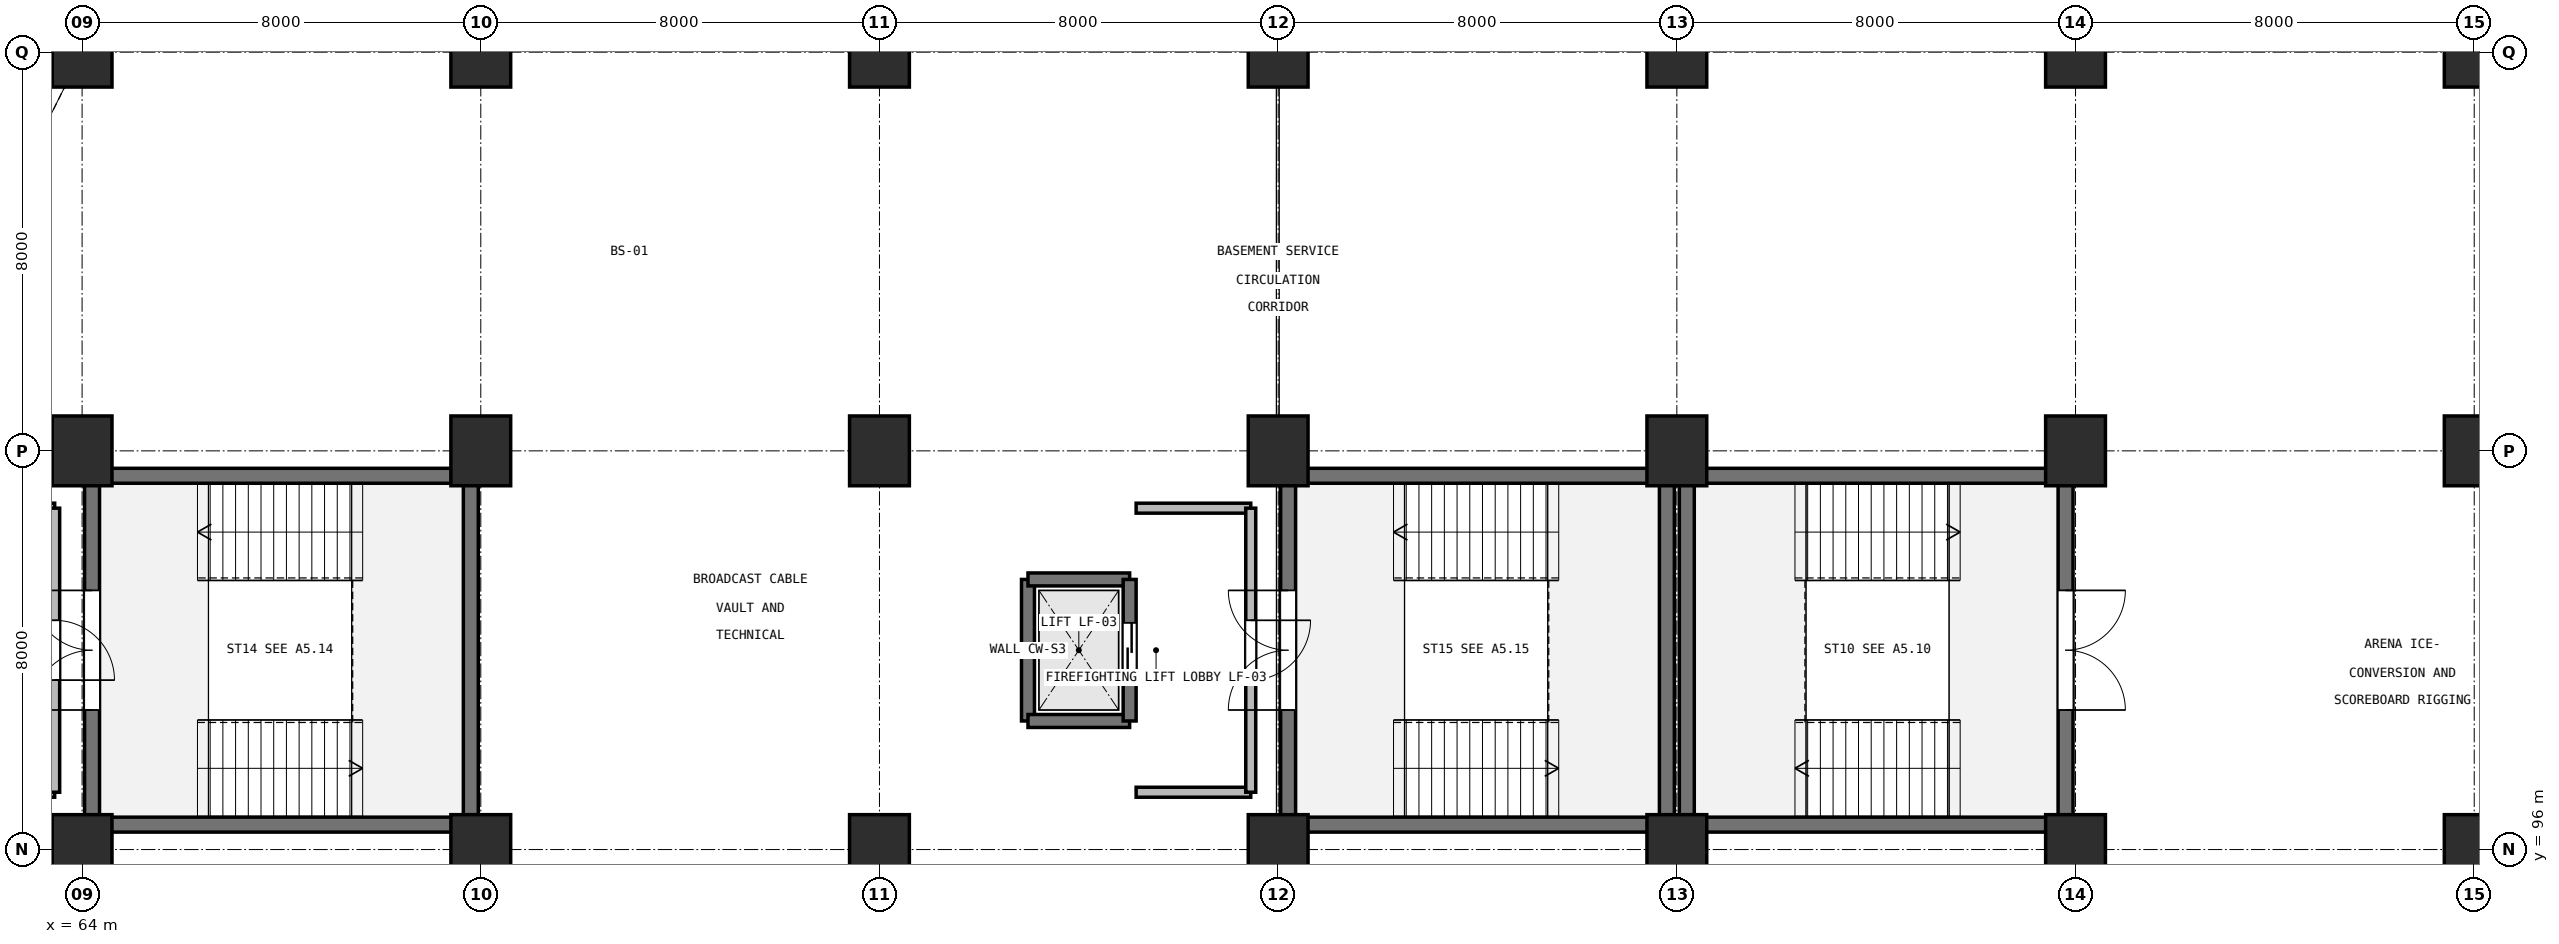
"""IFC4 building model, lengths in metres.
Left out: names, types, materials, properties, quantities, classifications, styles, units other than length and angle.
Written with IfcOpenShell. Run it as: python <this file> out.ifc"""

import sys

from ifc_helpers import new_model, si_unit, direction, frame, frame_2d, origin, origin_2d, place, context, subcontext, project, spatial, rectangle, extrude, element, fill, save


model = new_model("IFC4")
c1 = context("Model", 3, precision=1e-05, world=origin(), true_north=direction((0.0, 1.0)))
c2 = subcontext(c1, "Body", "Model", "MODEL_VIEW")
j1 = project(units=[si_unit("LENGTHUNIT", "METRE"), si_unit("PLANEANGLEUNIT", "RADIAN")], contexts=[c1])
p1 = place(None, origin())
s1 = spatial("IfcSite", under=j1, at=p1, CompositionType="ELEMENT")
p2 = place(p1, origin())
s2 = spatial("IfcBuilding", under=s1, at=p2, CompositionType="ELEMENT")
p3 = place(p2, frame((0.0, 0.0, -4.8)))
s3 = spatial("IfcBuildingStorey", under=s2, at=p3, CompositionType="ELEMENT", Elevation=-4.8)
for number, where, z_axis, x_axis in (
    (1, (64.0, 96.0, 0.0), (0.0, 0.0, 1.0), (1.0, 0.0, 0.0)),
    (2, (64.0, 104.0, 0.0), (0.0, 0.0, 1.0), (1.0, 0.0, 0.0)),
    (3, (64.0, 112.0, 0.0), (0.0, 0.0, 1.0), (1.0, 0.0, 0.0)),
    (4, (72.0, 96.0, 0.0), (0.0, 0.0, 1.0), (1.0, 0.0, 0.0)),
    (5, (72.0, 104.0, 0.0), (0.0, 0.0, 1.0), (1.0, 0.0, 0.0)),
    (6, (72.0, 112.0, 0.0), (0.0, 0.0, 1.0), (1.0, 0.0, 0.0)),
    (7, (80.0, 96.0, 0.0), (0.0, 0.0, 1.0), (1.0, 0.0, 0.0)),
    (8, (80.0, 104.0, 0.0), (0.0, 0.0, 1.0), (1.0, 0.0, 0.0)),
    (9, (80.0, 112.0, 0.0), (0.0, 0.0, 1.0), (1.0, 0.0, 0.0)),
    (10, (88.0, 96.0, 0.0), (0.0, 0.0, 1.0), (1.0, 0.0, 0.0)),
    (11, (88.0, 104.0, 0.0), (0.0, 0.0, 1.0), (1.0, 0.0, 0.0)),
    (12, (88.0, 112.0, 0.0), (0.0, 0.0, 1.0), (1.0, 0.0, 0.0)),
    (13, (96.0, 96.0, 0.0), (0.0, 0.0, 1.0), (1.0, 0.0, 0.0)),
    (14, (96.0, 104.0, 0.0), (0.0, 0.0, 1.0), (1.0, 0.0, 0.0)),
    (15, (96.0, 112.0, 0.0), (0.0, 0.0, 1.0), (1.0, 0.0, 0.0)),
    (16, (104.0, 96.0, 0.0), (0.0, 0.0, 1.0), (1.0, 0.0, 0.0)),
    (17, (104.0, 104.0, 0.0), (0.0, 0.0, 1.0), (1.0, 0.0, 0.0)),
    (18, (104.0, 112.0, 0.0), (0.0, 0.0, 1.0), (1.0, 0.0, 0.0)),
    (19, (112.0, 96.0, 0.0), (0.0, 0.0, 1.0), (1.0, 0.0, 0.0)),
    (20, (112.0, 104.0, 0.0), (0.0, 0.0, 1.0), (1.0, 0.0, 0.0)),
    (21, (112.0, 112.0, 0.0), (0.0, 0.0, 1.0), (1.0, 0.0, 0.0)),
):
    element("IfcColumn", number, at=place(p3, frame(where, z_axis=z_axis, x_axis=x_axis)), inside=s3, PredefinedType="COLUMN", context=c2, shape_type="SweptSolid", body=[
        extrude(rectangle(XDim=1.2, YDim=1.4, at=origin_2d()), origin(), (0.0, 0.0, 1.0), 4.8),
    ])
p4 = place(p3, frame((103.8, 96.5, 0.0), z_axis=(0.0, 0.0, 1.0), x_axis=(-1.0, 0.0, 0.0)))
e22 = element("IfcWall", 22, at=p4, inside=s3, PredefinedType="SHEAR", context=c2, shape_type="SweptSolid", body=[
    extrude(rectangle(XDim=7.6, YDim=0.3, at=frame_2d((3.8, 0.0))), origin(), (0.0, 0.0, 1.0), 4.46),
])
p5 = place(p3, frame((96.2, 96.5, 0.0), z_axis=(0.0, 0.0, 1.0), x_axis=(0.0, 1.0, 0.0)))
e23 = element("IfcWall", 23, at=p5, inside=s3, PredefinedType="SHEAR", context=c2, shape_type="SweptSolid", body=[
    extrude(rectangle(XDim=7.0, YDim=0.3, at=frame_2d((3.5, 0.0))), origin(), (0.0, 0.0, 1.0), 4.46),
])
p6 = place(p3, frame((96.2, 103.5, 0.0), z_axis=(0.0, 0.0, 1.0), x_axis=(1.0, 0.0, 0.0)))
e24 = element("IfcWall", 24, at=p6, inside=s3, PredefinedType="SHEAR", context=c2, shape_type="SweptSolid", body=[
    extrude(rectangle(XDim=7.6, YDim=0.3, at=frame_2d((3.8, 0.0))), origin(), (0.0, 0.0, 1.0), 4.46),
])
p7 = place(p3, frame((103.8, 103.5, 0.0), z_axis=(0.0, 0.0, 1.0), x_axis=(0.0, -1.0, 0.0)))
e25 = element("IfcWall", 25, at=p7, inside=s3, PredefinedType="SHEAR", context=c2, shape_type="SweptSolid", body=[
    extrude(rectangle(XDim=7.0, YDim=0.3, at=frame_2d((3.5, 0.0))), origin(), (0.0, 0.0, 1.0), 4.46),
])
p8 = place(p7, frame((2.3, 0.0, 0.0)))
e26 = element("IfcOpeningElement", 26, at=p8, cuts=e25, PredefinedType="OPENING", context=c2, shape_type="SweptSolid", body=[
    extrude(rectangle(XDim=2.4, YDim=2.2, at=frame_2d((1.2, 1.1))), frame((0.0, 0.16, 0.0), z_axis=(0.0, -1.0, 0.0), x_axis=(1.0, 0.0, 0.0)), (0.0, 0.0, 1.0), 0.32),
])
p9 = place(p3, frame((71.8, 96.5, 0.0), z_axis=(0.0, 0.0, 1.0), x_axis=(-1.0, 0.0, 0.0)))
e27 = element("IfcWall", 27, at=p9, inside=s3, PredefinedType="SHEAR", context=c2, shape_type="SweptSolid", body=[
    extrude(rectangle(XDim=7.6, YDim=0.3, at=frame_2d((3.8, 0.0))), origin(), (0.0, 0.0, 1.0), 4.46),
])
p10 = place(p3, frame((64.2, 96.5, 0.0), z_axis=(0.0, 0.0, 1.0), x_axis=(0.0, 1.0, 0.0)))
e28 = element("IfcWall", 28, at=p10, inside=s3, PredefinedType="SHEAR", context=c2, shape_type="SweptSolid", body=[
    extrude(rectangle(XDim=7.0, YDim=0.3, at=frame_2d((3.5, 0.0))), origin(), (0.0, 0.0, 1.0), 4.46),
])
p11 = place(p10, frame((2.3, 0.0, 0.0)))
e29 = element("IfcOpeningElement", 29, at=p11, cuts=e28, PredefinedType="OPENING", context=c2, shape_type="SweptSolid", body=[
    extrude(rectangle(XDim=2.4, YDim=2.2, at=frame_2d((1.2, 1.1))), frame((0.0, 0.16, 0.0), z_axis=(0.0, -1.0, 0.0), x_axis=(1.0, 0.0, 0.0)), (0.0, 0.0, 1.0), 0.32),
])
p12 = place(p3, frame((64.2, 103.5, 0.0), z_axis=(0.0, 0.0, 1.0), x_axis=(1.0, 0.0, 0.0)))
e30 = element("IfcWall", 30, at=p12, inside=s3, PredefinedType="SHEAR", context=c2, shape_type="SweptSolid", body=[
    extrude(rectangle(XDim=7.6, YDim=0.3, at=frame_2d((3.8, 0.0))), origin(), (0.0, 0.0, 1.0), 4.46),
])
p13 = place(p3, frame((71.8, 103.5, 0.0), z_axis=(0.0, 0.0, 1.0), x_axis=(0.0, -1.0, 0.0)))
e31 = element("IfcWall", 31, at=p13, inside=s3, PredefinedType="SHEAR", context=c2, shape_type="SweptSolid", body=[
    extrude(rectangle(XDim=7.0, YDim=0.3, at=frame_2d((3.5, 0.0))), origin(), (0.0, 0.0, 1.0), 4.46),
])
p14 = place(p3, frame((95.8, 96.5, 0.0), z_axis=(0.0, 0.0, 1.0), x_axis=(-1.0, 0.0, 0.0)))
e32 = element("IfcWall", 32, at=p14, inside=s3, PredefinedType="SHEAR", context=c2, shape_type="SweptSolid", body=[
    extrude(rectangle(XDim=7.6, YDim=0.3, at=frame_2d((3.8, 0.0))), origin(), (0.0, 0.0, 1.0), 4.46),
])
p15 = place(p3, frame((88.2, 96.5, 0.0), z_axis=(0.0, 0.0, 1.0), x_axis=(0.0, 1.0, 0.0)))
e33 = element("IfcWall", 33, at=p15, inside=s3, PredefinedType="SHEAR", context=c2, shape_type="SweptSolid", body=[
    extrude(rectangle(XDim=7.0, YDim=0.3, at=frame_2d((3.5, 0.0))), origin(), (0.0, 0.0, 1.0), 4.46),
])
p16 = place(p15, frame((2.3, 0.0, 0.0)))
e34 = element("IfcOpeningElement", 34, at=p16, cuts=e33, PredefinedType="OPENING", context=c2, shape_type="SweptSolid", body=[
    extrude(rectangle(XDim=2.4, YDim=2.2, at=frame_2d((1.2, 1.1))), frame((0.0, 0.16, 0.0), z_axis=(0.0, -1.0, 0.0), x_axis=(1.0, 0.0, 0.0)), (0.0, 0.0, 1.0), 0.32),
])
p17 = place(p3, frame((88.2, 103.5, 0.0), z_axis=(0.0, 0.0, 1.0), x_axis=(1.0, 0.0, 0.0)))
e35 = element("IfcWall", 35, at=p17, inside=s3, PredefinedType="SHEAR", context=c2, shape_type="SweptSolid", body=[
    extrude(rectangle(XDim=7.6, YDim=0.3, at=frame_2d((3.8, 0.0))), origin(), (0.0, 0.0, 1.0), 4.46),
])
p18 = place(p3, frame((95.8, 103.5, 0.0), z_axis=(0.0, 0.0, 1.0), x_axis=(0.0, -1.0, 0.0)))
e36 = element("IfcWall", 36, at=p18, inside=s3, PredefinedType="SHEAR", context=c2, shape_type="SweptSolid", body=[
    extrude(rectangle(XDim=7.0, YDim=0.3, at=frame_2d((3.5, 0.0))), origin(), (0.0, 0.0, 1.0), 4.46),
])
for number, where, z_axis, x_axis in (
    (37, (59.35, 102.85, 0.0), (0.0, 0.0, 1.0), (1.0, 0.0, 0.0)),
    (38, (63.45, 97.15, 0.0), (0.0, 0.0, 1.0), (-1.0, 0.0, 0.0)),
):
    element("IfcWall", number, at=place(p3, frame(where, z_axis=z_axis, x_axis=x_axis)), inside=s3, PredefinedType="PARTITIONING", context=c2, shape_type="SweptSolid", body=[
        extrude(rectangle(XDim=4.1, YDim=0.2, at=frame_2d((2.05, 0.0))), origin(), (0.0, 0.0, 1.0), 4.46),
    ])
p19 = place(p3, frame((63.45, 102.85, 0.0), z_axis=(0.0, 0.0, 1.0), x_axis=(0.0, -1.0, 0.0)))
e39 = element("IfcWall", 39, at=p19, inside=s3, PredefinedType="PARTITIONING", context=c2, shape_type="SweptSolid", body=[
    extrude(rectangle(XDim=5.7, YDim=0.2, at=frame_2d((2.85, 0.0))), origin(), (0.0, 0.0, 1.0), 3.45),
])
p20 = place(p19, frame((2.25, 0.0, 0.0)))
e40 = element("IfcOpeningElement", 40, at=p20, cuts=e39, PredefinedType="OPENING", context=c2, shape_type="SweptSolid", body=[
    extrude(rectangle(XDim=1.2, YDim=2.2, at=frame_2d((0.6, 1.1))), frame((0.0, 0.11, 0.0), z_axis=(0.0, -1.0, 0.0), x_axis=(1.0, 0.0, 0.0)), (0.0, 0.0, 1.0), 0.22),
])
p21 = place(p3, frame((82.98, 98.58, 0.0), z_axis=(0.0, 0.0, 1.0), x_axis=(0.0, 1.0, 0.0)))
e41 = element("IfcWall", 41, at=p21, inside=s3, PredefinedType="SHEAR", context=c2, shape_type="SweptSolid", body=[
    extrude(rectangle(XDim=2.84, YDim=0.26, at=frame_2d((1.42, 0.0))), origin(), (0.0, 0.0, 1.0), 4.46),
])
for number, where, z_axis, x_axis in (
    (42, (82.98, 101.42, 0.0), (0.0, 0.0, 1.0), (1.0, 0.0, 0.0)),
    (43, (85.02, 98.58, 0.0), (0.0, 0.0, 1.0), (-1.0, 0.0, 0.0)),
):
    element("IfcWall", number, at=place(p3, frame(where, z_axis=z_axis, x_axis=x_axis)), inside=s3, PredefinedType="SHEAR", context=c2, shape_type="SweptSolid", body=[
        extrude(rectangle(XDim=2.04, YDim=0.26, at=frame_2d((1.02, 0.0))), origin(), (0.0, 0.0, 1.0), 4.46),
    ])
p22 = place(p3, frame((85.02, 101.42, 0.0), z_axis=(0.0, 0.0, 1.0), x_axis=(0.0, -1.0, 0.0)))
e44 = element("IfcWall", 44, at=p22, inside=s3, PredefinedType="SHEAR", context=c2, shape_type="SweptSolid", body=[
    extrude(rectangle(XDim=2.84, YDim=0.26, at=frame_2d((1.42, 0.0))), origin(), (0.0, 0.0, 1.0), 4.46),
])
p23 = place(p22, frame((0.87, 0.0, 0.0)))
e45 = element("IfcOpeningElement", 45, at=p23, cuts=e44, PredefinedType="OPENING", context=c2, shape_type="SweptSolid", body=[
    extrude(rectangle(XDim=1.1, YDim=2.15, at=frame_2d((0.55, 1.075))), frame((0.0, 0.14, 0.0), z_axis=(0.0, -1.0, 0.0), x_axis=(1.0, 0.0, 0.0)), (0.0, 0.0, 1.0), 0.28),
])
for number, where, z_axis, x_axis in (
    (46, (85.15, 102.85, 0.0), (0.0, 0.0, 1.0), (1.0, 0.0, 0.0)),
    (47, (87.45, 97.15, 0.0), (0.0, 0.0, 1.0), (-1.0, 0.0, 0.0)),
):
    element("IfcWall", number, at=place(p3, frame(where, z_axis=z_axis, x_axis=x_axis)), inside=s3, PredefinedType="PARTITIONING", context=c2, shape_type="SweptSolid", body=[
        extrude(rectangle(XDim=2.3, YDim=0.2, at=frame_2d((1.15, 0.0))), origin(), (0.0, 0.0, 1.0), 4.46),
    ])
p24 = place(p3, frame((87.45, 102.85, 0.0), z_axis=(0.0, 0.0, 1.0), x_axis=(0.0, -1.0, 0.0)))
e48 = element("IfcWall", 48, at=p24, inside=s3, PredefinedType="PARTITIONING", context=c2, shape_type="SweptSolid", body=[
    extrude(rectangle(XDim=5.7, YDim=0.2, at=frame_2d((2.85, 0.0))), origin(), (0.0, 0.0, 1.0), 3.45),
])
p25 = place(p24, frame((2.25, 0.0, 0.0)))
e49 = element("IfcOpeningElement", 49, at=p25, cuts=e48, PredefinedType="OPENING", context=c2, shape_type="SweptSolid", body=[
    extrude(rectangle(XDim=1.2, YDim=2.2, at=frame_2d((0.6, 1.1))), frame((0.0, 0.11, 0.0), z_axis=(0.0, -1.0, 0.0), x_axis=(1.0, 0.0, 0.0)), (0.0, 0.0, 1.0), 0.22),
])
p26 = place(p8, frame((2.4, 0.0, 0.0), z_axis=(0.0, 0.0, 1.0), x_axis=(-1.0, 0.0, 0.0)))
e50 = element("IfcDoor", 50, at=p26, inside=s3, OperationType="DOUBLE_DOOR_SINGLE_SWING", PredefinedType="DOOR", context=c2, shape_type="SweptSolid", body=[
    extrude(rectangle(XDim=2.4, YDim=2.2, at=frame_2d((1.2, 1.1))), frame((0.0, 0.025, 0.0), z_axis=(0.0, -1.0, 0.0), x_axis=(1.0, 0.0, 0.0)), (0.0, 0.0, 1.0), 0.05),
])
fill(e26, e50)
p27 = place(p11, frame((2.4, 0.0, 0.0), z_axis=(0.0, 0.0, 1.0), x_axis=(-1.0, 0.0, 0.0)))
e51 = element("IfcDoor", 51, at=p27, inside=s3, OperationType="DOUBLE_DOOR_SINGLE_SWING", PredefinedType="DOOR", context=c2, shape_type="SweptSolid", body=[
    extrude(rectangle(XDim=2.4, YDim=2.2, at=frame_2d((1.2, 1.1))), frame((0.0, 0.025, 0.0), z_axis=(0.0, -1.0, 0.0), x_axis=(1.0, 0.0, 0.0)), (0.0, 0.0, 1.0), 0.05),
])
fill(e29, e51)
p28 = place(p16, frame((2.4, 0.0, 0.0), z_axis=(0.0, 0.0, 1.0), x_axis=(-1.0, 0.0, 0.0)))
e52 = element("IfcDoor", 52, at=p28, inside=s3, OperationType="DOUBLE_DOOR_SINGLE_SWING", PredefinedType="DOOR", context=c2, shape_type="SweptSolid", body=[
    extrude(rectangle(XDim=2.4, YDim=2.2, at=frame_2d((1.2, 1.1))), frame((0.0, 0.025, 0.0), z_axis=(0.0, -1.0, 0.0), x_axis=(1.0, 0.0, 0.0)), (0.0, 0.0, 1.0), 0.05),
])
fill(e34, e52)
p29 = place(p20, origin())
e53 = element("IfcDoor", 53, at=p29, inside=s3, OperationType="SINGLE_SWING_RIGHT", PredefinedType="DOOR", context=c2, shape_type="SweptSolid", body=[
    extrude(rectangle(XDim=1.2, YDim=2.2, at=frame_2d((0.6, 1.1))), frame((0.0, 0.025, 0.0), z_axis=(0.0, -1.0, 0.0), x_axis=(1.0, 0.0, 0.0)), (0.0, 0.0, 1.0), 0.05),
])
fill(e40, e53)
p30 = place(p23, origin())
e54 = element("IfcDoor", 54, at=p30, inside=s3, OperationType="SLIDING_TO_LEFT", PredefinedType="DOOR", context=c2, shape_type="SweptSolid", body=[
    extrude(rectangle(XDim=1.1, YDim=2.15, at=frame_2d((0.55, 1.075))), frame((0.0, 0.025, 0.0), z_axis=(0.0, -1.0, 0.0), x_axis=(1.0, 0.0, 0.0)), (0.0, 0.0, 1.0), 0.05),
])
fill(e45, e54)
p31 = place(p25, origin())
e55 = element("IfcDoor", 55, at=p31, inside=s3, OperationType="SINGLE_SWING_LEFT", PredefinedType="DOOR", context=c2, shape_type="SweptSolid", body=[
    extrude(rectangle(XDim=1.2, YDim=2.2, at=frame_2d((0.6, 1.1))), frame((0.0, 0.025, 0.0), z_axis=(0.0, -1.0, 0.0), x_axis=(1.0, 0.0, 0.0)), (0.0, 0.0, 1.0), 0.05),
])
fill(e49, e55)
save(model, sys.argv[1])
